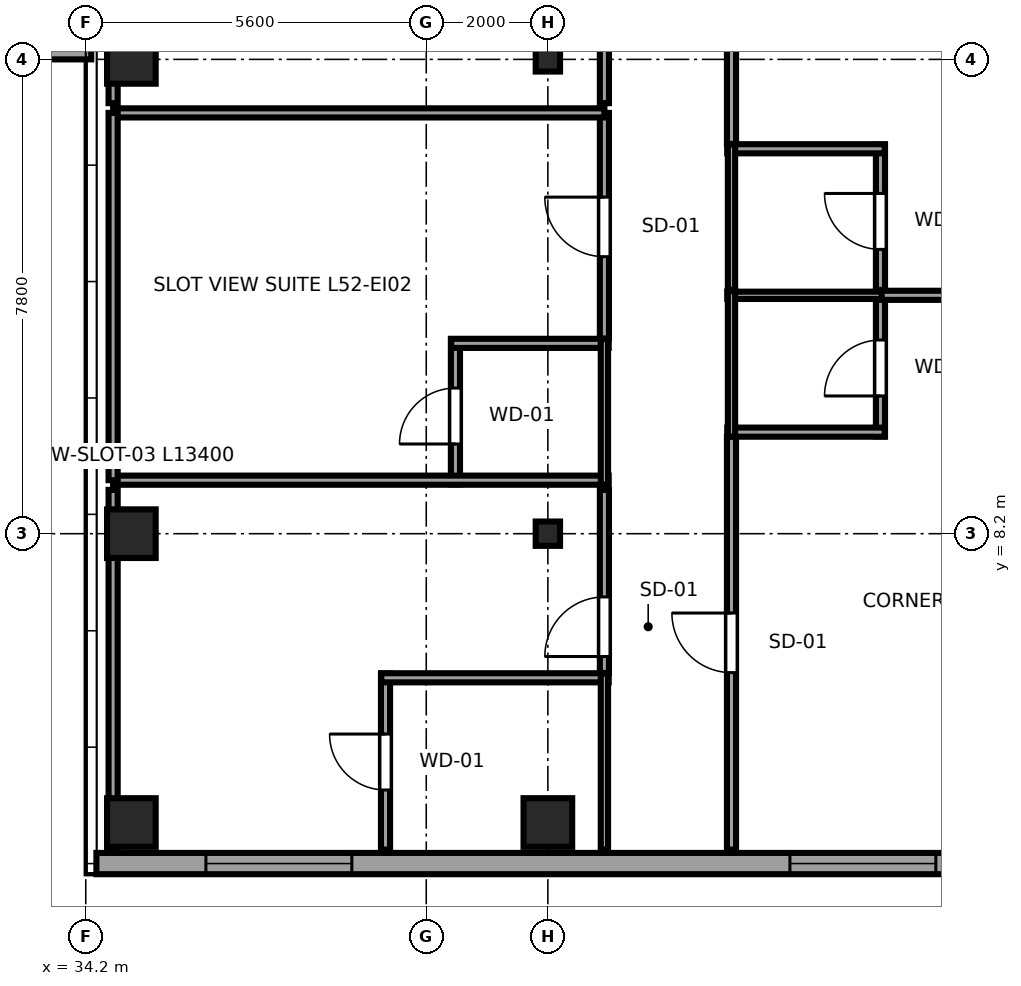
"""IFC4 building model, lengths in metres.
Left out: names, types, materials, properties, quantities, classifications, styles, units other than length and angle.
Written with IfcOpenShell. Run it as: python <this file> out.ifc"""

import sys

from ifc_helpers import new_model, si_unit, direction, frame, frame_2d, origin, origin_2d, place, context, subcontext, project, spatial, rectangle, i_section, extrude, source, transform, mapped, element, fill, save


model = new_model("IFC4")
c1 = context("Model", 3, precision=1e-05, world=origin(), true_north=direction((0.0, 1.0)))
c2 = subcontext(c1, "Body", "Model", "MODEL_VIEW")
j1 = project(units=[si_unit("LENGTHUNIT", "METRE"), si_unit("PLANEANGLEUNIT", "RADIAN")], contexts=[c1])
p1 = place(None, origin())
s1 = spatial("IfcSite", under=j1, at=p1, CompositionType="ELEMENT")
p2 = place(p1, origin())
s2 = spatial("IfcBuilding", under=s1, at=p2, CompositionType="ELEMENT")
p3 = place(p2, frame((0.0, 0.0, 198.2)))
s3 = spatial("IfcBuildingStorey", under=s2, at=p3, CompositionType="ELEMENT", Elevation=198.2)
m1 = source(origin(), c2, "Body", "SweptSolid", [
    extrude(rectangle(XDim=0.8, YDim=0.8, at=origin_2d()), origin(), (0.0, 0.0, 1.0), 3.55),
])
for number, where, z_axis, x_axis in (
    (1, (34.95, 3.45, 0.0), (0.0, 0.0, 1.0), (1.0, 0.0, 0.0)),
    (2, (34.95, 8.2, 0.0), (0.0, 0.0, 1.0), (1.0, 0.0, 0.0)),
    (3, (34.95, 16.0, 0.0), (0.0, 0.0, 1.0), (1.0, 0.0, 0.0)),
    (4, (41.8, 3.45, 0.0), (0.0, 0.0, 1.0), (1.0, 0.0, 0.0)),
):
    element("IfcColumn", number, at=place(p3, frame(where, z_axis=z_axis, x_axis=x_axis)), inside=s3, PredefinedType="COLUMN", context=c2, shape_type="MappedRepresentation", body=[
        mapped(m1, transform((0.0, 0.0, 0.0), x_axis=(1.0, 0.0, 0.0), y_axis=(0.0, 1.0, 0.0), z_axis=(0.0, 0.0, 1.0), scale=1.0)),
    ])
m2 = source(origin(), c2, "Body", "SweptSolid", [
    extrude(i_section(OverallWidth=0.4, OverallDepth=0.4, WebThickness=0.02, FlangeThickness=0.035, at=origin_2d()), origin(), (0.0, 0.0, 1.0), 3.55),
])
for number, where, z_axis, x_axis in (
    (5, (41.8, 8.2, 0.0), (0.0, 0.0, 1.0), (1.0, 0.0, 0.0)),
    (6, (41.8, 16.0, 0.0), (0.0, 0.0, 1.0), (1.0, 0.0, 0.0)),
):
    element("IfcColumn", number, at=place(p3, frame(where, z_axis=z_axis, x_axis=x_axis)), inside=s3, PredefinedType="COLUMN", context=c2, shape_type="MappedRepresentation", body=[
        mapped(m2, transform((0.0, 0.0, 0.0), x_axis=(1.0, 0.0, 0.0), y_axis=(0.0, 1.0, 0.0), z_axis=(0.0, 0.0, 1.0), scale=1.0)),
    ])
p4 = place(p3, frame((22.71, 16.175, 0.0), z_axis=(0.0, 0.0, 1.0), x_axis=(1.0, 0.0, 0.0)))
e7 = element("IfcWall", 7, at=p4, inside=s3, PredefinedType="SOLIDWALL", context=c2, shape_type="SweptSolid", body=[
    extrude(rectangle(XDim=11.58, YDim=0.35, at=frame_2d((5.79, 0.0))), origin(), (0.0, 0.0, 1.0), 2.758),
])
p5 = place(p4, frame((1.995, 0.0, 0.68)))
e8 = element("IfcOpeningElement", 8, at=p5, cuts=e7, PredefinedType="OPENING", context=c2, shape_type="SweptSolid", body=[
    extrude(rectangle(XDim=2.4, YDim=1.9, at=frame_2d((1.2, 0.95))), frame((0.0, 0.185, 0.0), z_axis=(0.0, -1.0, 0.0), x_axis=(1.0, 0.0, 0.0)), (0.0, 0.0, 1.0), 0.37),
])
p6 = place(p4, frame((7.185, 0.0, 0.68)))
e9 = element("IfcOpeningElement", 9, at=p6, cuts=e7, PredefinedType="OPENING", context=c2, shape_type="SweptSolid", body=[
    extrude(rectangle(XDim=2.4, YDim=1.9, at=frame_2d((1.2, 0.95))), frame((0.0, 0.185, 0.0), z_axis=(0.0, -1.0, 0.0), x_axis=(1.0, 0.0, 0.0)), (0.0, 0.0, 1.0), 0.37),
])
p7 = place(p3, frame((34.375, 2.775, 0.0), z_axis=(0.0, 0.0, 1.0), x_axis=(1.0, 0.0, 0.0)))
e10 = element("IfcWall", 10, at=p7, inside=s3, PredefinedType="SOLIDWALL", context=c2, shape_type="SweptSolid", body=[
    extrude(rectangle(XDim=15.608, YDim=0.35, at=frame_2d((7.804, 0.0))), origin(), (0.0, 0.0, 1.0), 3.37),
])
p8 = place(p7, frame((1.801, 0.0, 0.68)))
e11 = element("IfcOpeningElement", 11, at=p8, cuts=e10, PredefinedType="OPENING", context=c2, shape_type="SweptSolid", body=[
    extrude(rectangle(XDim=2.4, YDim=1.9, at=frame_2d((1.2, 0.95))), frame((0.0, 0.185, 0.0), z_axis=(0.0, -1.0, 0.0), x_axis=(1.0, 0.0, 0.0)), (0.0, 0.0, 1.0), 0.37),
])
p9 = place(p7, frame((11.406, 0.0, 0.68)))
e12 = element("IfcOpeningElement", 12, at=p9, cuts=e10, PredefinedType="OPENING", context=c2, shape_type="SweptSolid", body=[
    extrude(rectangle(XDim=2.4, YDim=1.9, at=frame_2d((1.2, 0.95))), frame((0.0, 0.185, 0.0), z_axis=(0.0, -1.0, 0.0), x_axis=(1.0, 0.0, 0.0)), (0.0, 0.0, 1.0), 0.37),
])
p10 = place(p3, frame((39.13, 3.005, 0.0), z_axis=(0.0, 0.0, 1.0), x_axis=(0.0, 1.0, 0.0)))
e13 = element("IfcWall", 13, at=p10, inside=s3, PredefinedType="PARTITIONING", context=c2, shape_type="SweptSolid", body=[
    extrude(rectangle(XDim=2.895, YDim=0.15, at=frame_2d((1.448, 0.0))), origin(), (0.0, 0.0, 1.0), 3.37),
])
p11 = place(p10, frame((0.98, 0.0, 0.0)))
e14 = element("IfcOpeningElement", 14, at=p11, cuts=e13, PredefinedType="OPENING", context=c2, shape_type="SweptSolid", body=[
    extrude(rectangle(XDim=0.92, YDim=2.01, at=frame_2d((0.46, 1.005))), frame((0.0, 0.085, 0.0), z_axis=(0.0, -1.0, 0.0), x_axis=(1.0, 0.0, 0.0)), (0.0, 0.0, 1.0), 0.17),
])
p12 = place(p3, frame((39.06, 5.83, 0.0), z_axis=(0.0, 0.0, 1.0), x_axis=(1.0, 0.0, 0.0)))
e15 = element("IfcWall", 15, at=p12, inside=s3, PredefinedType="PARTITIONING", context=c2, shape_type="SweptSolid", body=[
    extrude(rectangle(XDim=3.74, YDim=0.15, at=frame_2d((1.87, 0.0))), origin(), (0.0, 0.0, 1.0), 3.37),
])
p13 = place(p3, frame((42.73, 3.005, 0.0), z_axis=(0.0, 0.0, 1.0), x_axis=(0.0, 1.0, 0.0)))
e16 = element("IfcWall", 16, at=p13, inside=s3, PredefinedType="PLUMBINGWALL", context=c2, shape_type="SweptSolid", body=[
    extrude(rectangle(XDim=2.895, YDim=0.12, at=frame_2d((1.448, 0.0))), origin(), (0.0, 0.0, 1.0), 3.37),
])
p14 = place(p3, frame((40.28, 9.01, 0.0), z_axis=(0.0, 0.0, 1.0), x_axis=(0.0, 1.0, 0.0)))
e17 = element("IfcWall", 17, at=p14, inside=s3, PredefinedType="PARTITIONING", context=c2, shape_type="SweptSolid", body=[
    extrude(rectangle(XDim=2.39, YDim=0.15, at=frame_2d((1.195, 0.0))), origin(), (0.0, 0.0, 1.0), 3.37),
])
p15 = place(p14, frame((0.665, 0.0, 0.0)))
e18 = element("IfcOpeningElement", 18, at=p15, cuts=e17, PredefinedType="OPENING", context=c2, shape_type="SweptSolid", body=[
    extrude(rectangle(XDim=0.92, YDim=2.01, at=frame_2d((0.46, 1.005))), frame((0.0, 0.085, 0.0), z_axis=(0.0, -1.0, 0.0), x_axis=(1.0, 0.0, 0.0)), (0.0, 0.0, 1.0), 0.17),
])
p16 = place(p3, frame((34.65, 9.08, 0.0), z_axis=(0.0, 0.0, 1.0), x_axis=(1.0, 0.0, 0.0)))
e19 = element("IfcWall", 19, at=p16, inside=s3, PredefinedType="PARTITIONING", context=c2, shape_type="SweptSolid", body=[
    extrude(rectangle(XDim=8.15, YDim=0.15, at=frame_2d((4.075, 0.0))), origin(), (0.0, 0.0, 1.0), 3.37),
])
p17 = place(p3, frame((40.21, 11.33, 0.0), z_axis=(0.0, 0.0, 1.0), x_axis=(1.0, 0.0, 0.0)))
e20 = element("IfcWall", 20, at=p17, inside=s3, PredefinedType="PARTITIONING", context=c2, shape_type="SweptSolid", body=[
    extrude(rectangle(XDim=2.59, YDim=0.15, at=frame_2d((1.295, 0.0))), origin(), (0.0, 0.0, 1.0), 3.37),
])
p18 = place(p3, frame((42.73, 9.01, 0.0), z_axis=(0.0, 0.0, 1.0), x_axis=(0.0, 1.0, 0.0)))
e21 = element("IfcWall", 21, at=p18, inside=s3, PredefinedType="PLUMBINGWALL", context=c2, shape_type="SweptSolid", body=[
    extrude(rectangle(XDim=2.39, YDim=0.12, at=frame_2d((1.195, 0.0))), origin(), (0.0, 0.0, 1.0), 3.37),
])
p19 = place(p3, frame((47.27, 9.8, 0.0), z_axis=(0.0, 0.0, 1.0), x_axis=(0.0, 1.0, 0.0)))
e22 = element("IfcWall", 22, at=p19, inside=s3, PredefinedType="PARTITIONING", context=c2, shape_type="SweptSolid", body=[
    extrude(rectangle(XDim=2.39, YDim=0.15, at=frame_2d((1.195, 0.0))), origin(), (0.0, 0.0, 1.0), 3.37),
])
p20 = place(p19, frame((0.665, 0.0, 0.0)))
e23 = element("IfcOpeningElement", 23, at=p20, cuts=e22, PredefinedType="OPENING", context=c2, shape_type="SweptSolid", body=[
    extrude(rectangle(XDim=0.92, YDim=2.01, at=frame_2d((0.46, 1.005))), frame((0.0, 0.085, 0.0), z_axis=(0.0, -1.0, 0.0), x_axis=(1.0, 0.0, 0.0)), (0.0, 0.0, 1.0), 0.17),
])
p21 = place(p3, frame((44.75, 9.87, 0.0), z_axis=(0.0, 0.0, 1.0), x_axis=(1.0, 0.0, 0.0)))
e24 = element("IfcWall", 24, at=p21, inside=s3, PredefinedType="PARTITIONING", context=c2, shape_type="SweptSolid", body=[
    extrude(rectangle(XDim=2.59, YDim=0.15, at=frame_2d((1.295, 0.0))), origin(), (0.0, 0.0, 1.0), 3.37),
])
p22 = place(p3, frame((44.75, 12.12, 0.0), z_axis=(0.0, 0.0, 1.0), x_axis=(1.0, 0.0, 0.0)))
e25 = element("IfcWall", 25, at=p22, inside=s3, PredefinedType="PLUMBINGWALL", context=c2, shape_type="SweptSolid", body=[
    extrude(rectangle(XDim=2.59, YDim=0.12, at=frame_2d((1.295, 0.0))), origin(), (0.0, 0.0, 1.0), 3.37),
])
p23 = place(p3, frame((44.82, 9.8, 0.0), z_axis=(0.0, 0.0, 1.0), x_axis=(0.0, 1.0, 0.0)))
e26 = element("IfcWall", 26, at=p23, inside=s3, PredefinedType="PLUMBINGWALL", context=c2, shape_type="SweptSolid", body=[
    extrude(rectangle(XDim=2.39, YDim=0.12, at=frame_2d((1.195, 0.0))), origin(), (0.0, 0.0, 1.0), 3.37),
])
p24 = place(p3, frame((47.27, 12.21, 0.0), z_axis=(0.0, 0.0, 1.0), x_axis=(0.0, 1.0, 0.0)))
e27 = element("IfcWall", 27, at=p24, inside=s3, PredefinedType="PARTITIONING", context=c2, shape_type="SweptSolid", body=[
    extrude(rectangle(XDim=2.39, YDim=0.15, at=frame_2d((1.195, 0.0))), origin(), (0.0, 0.0, 1.0), 3.37),
])
p25 = place(p24, frame((0.665, 0.0, 0.0)))
e28 = element("IfcOpeningElement", 28, at=p25, cuts=e27, PredefinedType="OPENING", context=c2, shape_type="SweptSolid", body=[
    extrude(rectangle(XDim=0.92, YDim=2.01, at=frame_2d((0.46, 1.005))), frame((0.0, 0.085, 0.0), z_axis=(0.0, -1.0, 0.0), x_axis=(1.0, 0.0, 0.0)), (0.0, 0.0, 1.0), 0.17),
])
p26 = place(p3, frame((44.75, 14.53, 0.0), z_axis=(0.0, 0.0, 1.0), x_axis=(1.0, 0.0, 0.0)))
e29 = element("IfcWall", 29, at=p26, inside=s3, PredefinedType="PARTITIONING", context=c2, shape_type="SweptSolid", body=[
    extrude(rectangle(XDim=2.59, YDim=0.15, at=frame_2d((1.295, 0.0))), origin(), (0.0, 0.0, 1.0), 3.37),
])
p27 = place(p3, frame((44.82, 12.21, 0.0), z_axis=(0.0, 0.0, 1.0), x_axis=(0.0, 1.0, 0.0)))
e30 = element("IfcWall", 30, at=p27, inside=s3, PredefinedType="PLUMBINGWALL", context=c2, shape_type="SweptSolid", body=[
    extrude(rectangle(XDim=2.39, YDim=0.12, at=frame_2d((1.195, 0.0))), origin(), (0.0, 0.0, 1.0), 3.37),
])
p28 = place(p3, frame((42.73, 5.91, 0.0), z_axis=(0.0, 0.0, 1.0), x_axis=(0.0, 1.0, 0.0)))
e31 = element("IfcWall", 31, at=p28, inside=s3, PredefinedType="PARTITIONING", context=c2, shape_type="SweptSolid", body=[
    extrude(rectangle(XDim=3.01, YDim=0.15, at=frame_2d((1.505, 0.0))), origin(), (0.0, 0.0, 1.0), 3.37),
])
p29 = place(p28, frame((0.27, 0.0, 0.0)))
e32 = element("IfcOpeningElement", 32, at=p29, cuts=e31, PredefinedType="OPENING", context=c2, shape_type="SweptSolid", body=[
    extrude(rectangle(XDim=0.98, YDim=2.12, at=frame_2d((0.49, 1.06))), frame((0.0, 0.085, 0.0), z_axis=(0.0, -1.0, 0.0), x_axis=(1.0, 0.0, 0.0)), (0.0, 0.0, 1.0), 0.17),
])
p30 = place(p3, frame((34.65, 3.005, 0.0), z_axis=(0.0, 0.0, 1.0), x_axis=(0.0, 1.0, 0.0)))
e33 = element("IfcWall", 33, at=p30, inside=s3, PredefinedType="PARTITIONING", context=c2, shape_type="SweptSolid", body=[
    extrude(rectangle(XDim=5.915, YDim=0.15, at=frame_2d((2.958, 0.0))), origin(), (0.0, 0.0, 1.0), 3.37),
])
p31 = place(p3, frame((42.73, 11.41, 0.0), z_axis=(0.0, 0.0, 1.0), x_axis=(0.0, 1.0, 0.0)))
e34 = element("IfcWall", 34, at=p31, inside=s3, PredefinedType="PARTITIONING", context=c2, shape_type="SweptSolid", body=[
    extrude(rectangle(XDim=3.71, YDim=0.15, at=frame_2d((1.855, 0.0))), origin(), (0.0, 0.0, 1.0), 3.37),
])
p32 = place(p31, frame((1.345, 0.0, 0.0)))
e35 = element("IfcOpeningElement", 35, at=p32, cuts=e34, PredefinedType="OPENING", context=c2, shape_type="SweptSolid", body=[
    extrude(rectangle(XDim=0.98, YDim=2.12, at=frame_2d((0.49, 1.06))), frame((0.0, 0.085, 0.0), z_axis=(0.0, -1.0, 0.0), x_axis=(1.0, 0.0, 0.0)), (0.0, 0.0, 1.0), 0.17),
])
p33 = place(p3, frame((34.65, 15.12, 0.0), z_axis=(0.0, 0.0, 1.0), x_axis=(1.0, 0.0, 0.0)))
e36 = element("IfcWall", 36, at=p33, inside=s3, PredefinedType="PARTITIONING", context=c2, shape_type="SweptSolid", body=[
    extrude(rectangle(XDim=8.08, YDim=0.15, at=frame_2d((4.04, 0.0))), origin(), (0.0, 0.0, 1.0), 3.37),
])
p34 = place(p3, frame((34.65, 9.08, 0.0), z_axis=(0.0, 0.0, 1.0), x_axis=(0.0, 1.0, 0.0)))
e37 = element("IfcWall", 37, at=p34, inside=s3, PredefinedType="PARTITIONING", context=c2, shape_type="SweptSolid", body=[
    extrude(rectangle(XDim=6.04, YDim=0.15, at=frame_2d((3.02, 0.0))), origin(), (0.0, 0.0, 1.0), 3.37),
])
p35 = place(p3, frame((42.73, 15.28, 0.0), z_axis=(0.0, 0.0, 1.0), x_axis=(0.0, 1.0, 0.0)))
e38 = element("IfcWall", 38, at=p35, inside=s3, PredefinedType="PARTITIONING", context=c2, shape_type="SweptSolid", body=[
    extrude(rectangle(XDim=3.81, YDim=0.15, at=frame_2d((1.905, 0.0))), origin(), (0.0, 0.0, 1.0), 3.37),
])
p36 = place(p35, frame((1.695, 0.0, 0.0)))
e39 = element("IfcOpeningElement", 39, at=p36, cuts=e38, PredefinedType="OPENING", context=c2, shape_type="SweptSolid", body=[
    extrude(rectangle(XDim=0.98, YDim=2.12, at=frame_2d((0.49, 1.06))), frame((0.0, 0.085, 0.0), z_axis=(0.0, -1.0, 0.0), x_axis=(1.0, 0.0, 0.0)), (0.0, 0.0, 1.0), 0.17),
])
p37 = place(p3, frame((34.65, 15.28, 0.0), z_axis=(0.0, 0.0, 1.0), x_axis=(0.0, 1.0, 0.0)))
e40 = element("IfcWall", 40, at=p37, inside=s3, PredefinedType="PARTITIONING", context=c2, shape_type="SweptSolid", body=[
    extrude(rectangle(XDim=6.14, YDim=0.15, at=frame_2d((3.07, 0.0))), origin(), (0.0, 0.0, 1.0), 3.37),
])
p38 = place(p3, frame((44.82, 3.005, 0.0), z_axis=(0.0, 0.0, 1.0), x_axis=(0.0, 1.0, 0.0)))
e41 = element("IfcWall", 41, at=p38, inside=s3, PredefinedType="PARTITIONING", context=c2, shape_type="SweptSolid", body=[
    extrude(rectangle(XDim=6.785, YDim=0.15, at=frame_2d((3.393, 0.0))), origin(), (0.0, 0.0, 1.0), 3.37),
])
p39 = place(p38, frame((2.91, 0.0, 0.0)))
e42 = element("IfcOpeningElement", 42, at=p39, cuts=e41, PredefinedType="OPENING", context=c2, shape_type="SweptSolid", body=[
    extrude(rectangle(XDim=0.98, YDim=2.12, at=frame_2d((0.49, 1.06))), frame((0.0, 0.085, 0.0), z_axis=(0.0, -1.0, 0.0), x_axis=(1.0, 0.0, 0.0)), (0.0, 0.0, 1.0), 0.17),
])
p40 = place(p3, frame((47.29, 12.12, 0.0), z_axis=(0.0, 0.0, 1.0), x_axis=(1.0, 0.0, 0.0)))
e43 = element("IfcWall", 43, at=p40, inside=s3, PredefinedType="PARTITIONING", context=c2, shape_type="SweptSolid", body=[
    extrude(rectangle(XDim=6.705, YDim=0.15, at=frame_2d((3.353, 0.0))), origin(), (0.0, 0.0, 1.0), 3.37),
])
p41 = place(p3, frame((44.82, 14.61, 0.0), z_axis=(0.0, 0.0, 1.0), x_axis=(0.0, 1.0, 0.0)))
e44 = element("IfcWall", 44, at=p41, inside=s3, PredefinedType="PARTITIONING", context=c2, shape_type="SweptSolid", body=[
    extrude(rectangle(XDim=6.81, YDim=0.15, at=frame_2d((3.405, 0.0))), origin(), (0.0, 0.0, 1.0), 3.37),
])
p42 = place(p41, frame((2.895, 0.0, 0.0)))
e45 = element("IfcOpeningElement", 45, at=p42, cuts=e44, PredefinedType="OPENING", context=c2, shape_type="SweptSolid", body=[
    extrude(rectangle(XDim=0.98, YDim=2.12, at=frame_2d((0.49, 1.06))), frame((0.0, 0.085, 0.0), z_axis=(0.0, -1.0, 0.0), x_axis=(1.0, 0.0, 0.0)), (0.0, 0.0, 1.0), 0.17),
])
m3 = source(origin(), c2, "Body", "SweptSolid", [
    extrude(rectangle(XDim=2.4, YDim=1.9, at=frame_2d((1.2, 0.95))), frame((0.0, 0.09, 0.0), z_axis=(0.0, -1.0, 0.0), x_axis=(1.0, 0.0, 0.0)), (0.0, 0.0, 1.0), 0.06),
])
p43 = place(p8, origin())
e46 = element("IfcWindow", 46, at=p43, inside=s3, PartitioningType="TRIPLE_PANEL_HORIZONTAL", PredefinedType="WINDOW", context=c2, shape_type="MappedRepresentation", body=[
    mapped(m3, transform((0.0, 0.0, 0.0), x_axis=(1.0, 0.0, 0.0), y_axis=(0.0, 1.0, 0.0), z_axis=(0.0, 0.0, 1.0), scale=1.0)),
])
fill(e11, e46)
p44 = place(p9, origin())
e47 = element("IfcWindow", 47, at=p44, inside=s3, PartitioningType="TRIPLE_PANEL_HORIZONTAL", PredefinedType="WINDOW", context=c2, shape_type="MappedRepresentation", body=[
    mapped(m3, transform((0.0, 0.0, 0.0), x_axis=(1.0, 0.0, 0.0), y_axis=(0.0, 1.0, 0.0), z_axis=(0.0, 0.0, 1.0), scale=1.0)),
])
fill(e12, e47)
m4 = source(origin(), c2, "Body", "SweptSolid", [
    extrude(rectangle(XDim=0.92, YDim=2.01, at=frame_2d((0.46, 1.005))), frame((0.0, 0.025, 0.0), z_axis=(0.0, -1.0, 0.0), x_axis=(1.0, 0.0, 0.0)), (0.0, 0.0, 1.0), 0.05),
])
p45 = place(p11, origin())
e48 = element("IfcDoor", 48, at=p45, inside=s3, OperationType="SINGLE_SWING_RIGHT", PredefinedType="DOOR", context=c2, shape_type="MappedRepresentation", body=[
    mapped(m4, transform((0.0, 0.0, 0.0), x_axis=(1.0, 0.0, 0.0), y_axis=(0.0, 1.0, 0.0), z_axis=(0.0, 0.0, 1.0), scale=1.0)),
])
fill(e14, e48)
p46 = place(p15, origin())
e49 = element("IfcDoor", 49, at=p46, inside=s3, OperationType="SINGLE_SWING_LEFT", PredefinedType="DOOR", context=c2, shape_type="MappedRepresentation", body=[
    mapped(m4, transform((0.0, 0.0, 0.0), x_axis=(1.0, 0.0, 0.0), y_axis=(0.0, 1.0, 0.0), z_axis=(0.0, 0.0, 1.0), scale=1.0)),
])
fill(e18, e49)
p47 = place(p20, origin())
e50 = element("IfcDoor", 50, at=p47, inside=s3, OperationType="SINGLE_SWING_LEFT", PredefinedType="DOOR", context=c2, shape_type="MappedRepresentation", body=[
    mapped(m4, transform((0.0, 0.0, 0.0), x_axis=(1.0, 0.0, 0.0), y_axis=(0.0, 1.0, 0.0), z_axis=(0.0, 0.0, 1.0), scale=1.0)),
])
fill(e23, e50)
p48 = place(p25, origin())
e51 = element("IfcDoor", 51, at=p48, inside=s3, OperationType="SINGLE_SWING_RIGHT", PredefinedType="DOOR", context=c2, shape_type="MappedRepresentation", body=[
    mapped(m4, transform((0.0, 0.0, 0.0), x_axis=(1.0, 0.0, 0.0), y_axis=(0.0, 1.0, 0.0), z_axis=(0.0, 0.0, 1.0), scale=1.0)),
])
fill(e28, e51)
m5 = source(origin(), c2, "Body", "SweptSolid", [
    extrude(rectangle(XDim=0.98, YDim=2.12, at=frame_2d((0.49, 1.06))), frame((0.0, 0.025, 0.0), z_axis=(0.0, -1.0, 0.0), x_axis=(1.0, 0.0, 0.0)), (0.0, 0.0, 1.0), 0.05),
])
p49 = place(p29, origin())
e52 = element("IfcDoor", 52, at=p49, inside=s3, OperationType="SINGLE_SWING_LEFT", PredefinedType="DOOR", context=c2, shape_type="MappedRepresentation", body=[
    mapped(m5, transform((0.0, 0.0, 0.0), x_axis=(1.0, 0.0, 0.0), y_axis=(0.0, 1.0, 0.0), z_axis=(0.0, 0.0, 1.0), scale=1.0)),
])
fill(e32, e52)
p50 = place(p32, origin())
e53 = element("IfcDoor", 53, at=p50, inside=s3, OperationType="SINGLE_SWING_RIGHT", PredefinedType="DOOR", context=c2, shape_type="MappedRepresentation", body=[
    mapped(m5, transform((0.0, 0.0, 0.0), x_axis=(1.0, 0.0, 0.0), y_axis=(0.0, 1.0, 0.0), z_axis=(0.0, 0.0, 1.0), scale=1.0)),
])
fill(e35, e53)
p51 = place(p39, origin())
e54 = element("IfcDoor", 54, at=p51, inside=s3, OperationType="SINGLE_SWING_RIGHT", PredefinedType="DOOR", context=c2, shape_type="MappedRepresentation", body=[
    mapped(m5, transform((0.0, 0.0, 0.0), x_axis=(1.0, 0.0, 0.0), y_axis=(0.0, 1.0, 0.0), z_axis=(0.0, 0.0, 1.0), scale=1.0)),
])
fill(e42, e54)
save(model, sys.argv[1])
